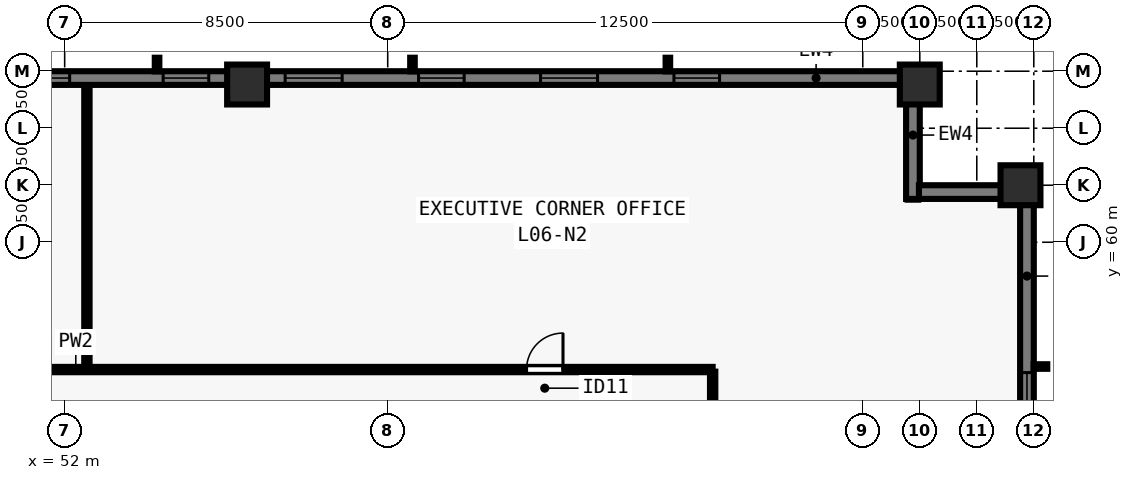
"""IFC4 building model, lengths in metres.
Left out: names, types, materials, properties, quantities, classifications, styles, units other than length and angle.
Written with IfcOpenShell. Run it as: python <this file> out.ifc"""

import sys

from ifc_helpers import new_model, si_unit, direction, frame, frame_2d, origin, origin_2d, place, context, subcontext, project, spatial, rectangle, extrude, element, fill, save


model = new_model("IFC4")
c1 = context("Model", 3, precision=1e-05, world=origin(), true_north=direction((0.0, 1.0)))
c2 = subcontext(c1, "Body", "Model", "MODEL_VIEW")
j1 = project(units=[si_unit("LENGTHUNIT", "METRE"), si_unit("PLANEANGLEUNIT", "RADIAN")], contexts=[c1])
p1 = place(None, origin())
s1 = spatial("IfcSite", under=j1, at=p1, CompositionType="ELEMENT")
p2 = place(p1, origin())
s2 = spatial("IfcBuilding", under=s1, at=p2, CompositionType="ELEMENT")
p3 = place(p2, frame((0.0, 0.0, 27.0)))
s3 = spatial("IfcBuildingStorey", under=s2, at=p3, CompositionType="ELEMENT", Elevation=27.0)
for number, where, z_axis, x_axis in (
    (1, (77.15, 61.5, 0.0), (0.0, 0.0, 1.0), (0.0, 1.0, 0.0)),
    (2, (74.5, 64.15, 0.0), (0.0, 0.0, 1.0), (1.0, 0.0, 0.0)),
    (3, (56.8, 64.15, 0.0), (0.0, 0.0, 1.0), (1.0, 0.0, 0.0)),
):
    element("IfcColumn", number, at=place(p3, frame(where, z_axis=z_axis, x_axis=x_axis)), inside=s3, PredefinedType="COLUMN", context=c2, shape_type="SweptSolid", body=[
        extrude(rectangle(XDim=1.05, YDim=1.05, at=origin_2d()), origin(), (0.0, 0.0, 1.0), 3.5),
    ])
p4 = place(p3, frame((29.5, 64.32, 0.0), z_axis=(0.0, 0.0, 1.0), x_axis=(1.0, 0.0, 0.0)))
e4 = element("IfcWall", 4, at=p4, inside=s3, PredefinedType="SOLIDWALL", context=c2, shape_type="SweptSolid", body=[
    extrude(rectangle(XDim=44.662, YDim=0.36, at=frame_2d((22.331, 0.0))), origin(), (0.0, 0.0, 1.0), 3.28),
])
p5 = place(p4, frame((4.93, 0.0, 0.8)))
e5 = element("IfcOpeningElement", 5, at=p5, cuts=e4, PredefinedType="OPENING", context=c2, shape_type="SweptSolid", body=[
    extrude(rectangle(XDim=1.2, YDim=1.544, at=frame_2d((0.6, 0.772))), frame((0.0, 0.19, 0.0), z_axis=(0.0, -1.0, 0.0), x_axis=(1.0, 0.0, 0.0)), (0.0, 0.0, 1.0), 0.38),
])
p6 = place(p4, frame((8.14, 0.0, 0.8)))
e6 = element("IfcOpeningElement", 6, at=p6, cuts=e4, PredefinedType="OPENING", context=c2, shape_type="SweptSolid", body=[
    extrude(rectangle(XDim=1.5, YDim=1.544, at=frame_2d((0.75, 0.772))), frame((0.0, 0.19, 0.0), z_axis=(0.0, -1.0, 0.0), x_axis=(1.0, 0.0, 0.0)), (0.0, 0.0, 1.0), 0.38),
])
p7 = place(p4, frame((11.65, 0.0, 0.8)))
e7 = element("IfcOpeningElement", 7, at=p7, cuts=e4, PredefinedType="OPENING", context=c2, shape_type="SweptSolid", body=[
    extrude(rectangle(XDim=1.2, YDim=1.544, at=frame_2d((0.6, 0.772))), frame((0.0, 0.19, 0.0), z_axis=(0.0, -1.0, 0.0), x_axis=(1.0, 0.0, 0.0)), (0.0, 0.0, 1.0), 0.38),
])
p8 = place(p4, frame((14.861, 0.0, 0.8)))
e8 = element("IfcOpeningElement", 8, at=p8, cuts=e4, PredefinedType="OPENING", context=c2, shape_type="SweptSolid", body=[
    extrude(rectangle(XDim=1.5, YDim=1.544, at=frame_2d((0.75, 0.772))), frame((0.0, 0.19, 0.0), z_axis=(0.0, -1.0, 0.0), x_axis=(1.0, 0.0, 0.0)), (0.0, 0.0, 1.0), 0.38),
])
p9 = place(p4, frame((18.821, 0.0, 0.8)))
e9 = element("IfcOpeningElement", 9, at=p9, cuts=e4, PredefinedType="OPENING", context=c2, shape_type="SweptSolid", body=[
    extrude(rectangle(XDim=1.2, YDim=1.544, at=frame_2d((0.6, 0.772))), frame((0.0, 0.19, 0.0), z_axis=(0.0, -1.0, 0.0), x_axis=(1.0, 0.0, 0.0)), (0.0, 0.0, 1.0), 0.38),
])
p10 = place(p4, frame((21.131, 0.0, 0.8)))
e10 = element("IfcOpeningElement", 10, at=p10, cuts=e4, PredefinedType="OPENING", context=c2, shape_type="SweptSolid", body=[
    extrude(rectangle(XDim=1.5, YDim=1.544, at=frame_2d((0.75, 0.772))), frame((0.0, 0.19, 0.0), z_axis=(0.0, -1.0, 0.0), x_axis=(1.0, 0.0, 0.0)), (0.0, 0.0, 1.0), 0.38),
])
p11 = place(p4, frame((25.091, 0.0, 0.8)))
e11 = element("IfcOpeningElement", 11, at=p11, cuts=e4, PredefinedType="OPENING", context=c2, shape_type="SweptSolid", body=[
    extrude(rectangle(XDim=1.2, YDim=1.544, at=frame_2d((0.6, 0.772))), frame((0.0, 0.19, 0.0), z_axis=(0.0, -1.0, 0.0), x_axis=(1.0, 0.0, 0.0)), (0.0, 0.0, 1.0), 0.38),
])
p12 = place(p4, frame((28.302, 0.0, 0.8)))
e12 = element("IfcOpeningElement", 12, at=p12, cuts=e4, PredefinedType="OPENING", context=c2, shape_type="SweptSolid", body=[
    extrude(rectangle(XDim=1.5, YDim=1.544, at=frame_2d((0.75, 0.772))), frame((0.0, 0.19, 0.0), z_axis=(0.0, -1.0, 0.0), x_axis=(1.0, 0.0, 0.0)), (0.0, 0.0, 1.0), 0.38),
])
p13 = place(p4, frame((31.812, 0.0, 0.8)))
e13 = element("IfcOpeningElement", 13, at=p13, cuts=e4, PredefinedType="OPENING", context=c2, shape_type="SweptSolid", body=[
    extrude(rectangle(XDim=1.2, YDim=1.544, at=frame_2d((0.6, 0.772))), frame((0.0, 0.19, 0.0), z_axis=(0.0, -1.0, 0.0), x_axis=(1.0, 0.0, 0.0)), (0.0, 0.0, 1.0), 0.38),
])
p14 = place(p4, frame((35.022, 0.0, 0.8)))
e14 = element("IfcOpeningElement", 14, at=p14, cuts=e4, PredefinedType="OPENING", context=c2, shape_type="SweptSolid", body=[
    extrude(rectangle(XDim=1.5, YDim=1.544, at=frame_2d((0.75, 0.772))), frame((0.0, 0.19, 0.0), z_axis=(0.0, -1.0, 0.0), x_axis=(1.0, 0.0, 0.0)), (0.0, 0.0, 1.0), 0.38),
])
p15 = place(p4, frame((38.532, 0.0, 0.8)))
e15 = element("IfcOpeningElement", 15, at=p15, cuts=e4, PredefinedType="OPENING", context=c2, shape_type="SweptSolid", body=[
    extrude(rectangle(XDim=1.2, YDim=1.544, at=frame_2d((0.6, 0.772))), frame((0.0, 0.19, 0.0), z_axis=(0.0, -1.0, 0.0), x_axis=(1.0, 0.0, 0.0)), (0.0, 0.0, 1.0), 0.38),
])
p16 = place(p3, frame((74.32, 64.5, 0.0), z_axis=(0.0, 0.0, 1.0), x_axis=(0.0, -1.0, 0.0)))
e16 = element("IfcWall", 16, at=p16, inside=s3, PredefinedType="SOLIDWALL", context=c2, shape_type="SweptSolid", body=[
    extrude(rectangle(XDim=3.36, YDim=0.36, at=frame_2d((1.68, 0.0))), origin(), (0.0, 0.0, 1.0), 3.28),
])
p17 = place(p3, frame((74.478, 61.32, 0.0), z_axis=(0.0, 0.0, 1.0), x_axis=(1.0, 0.0, 0.0)))
e17 = element("IfcWall", 17, at=p17, inside=s3, PredefinedType="SOLIDWALL", context=c2, shape_type="SweptSolid", body=[
    extrude(rectangle(XDim=2.684, YDim=0.36, at=frame_2d((1.342, 0.0))), origin(), (0.0, 0.0, 1.0), 3.28),
])
p18 = place(p3, frame((77.32, 61.5, 0.0), z_axis=(0.0, 0.0, 1.0), x_axis=(0.0, -1.0, 0.0)))
e18 = element("IfcWall", 18, at=p18, inside=s3, PredefinedType="SOLIDWALL", context=c2, shape_type="SweptSolid", body=[
    extrude(rectangle(XDim=44.662, YDim=0.36, at=frame_2d((22.331, 0.0))), origin(), (0.0, 0.0, 1.0), 3.28),
])
p19 = place(p18, frame((4.93, 0.0, 0.8)))
e19 = element("IfcOpeningElement", 19, at=p19, cuts=e18, PredefinedType="OPENING", context=c2, shape_type="SweptSolid", body=[
    extrude(rectangle(XDim=1.2, YDim=1.544, at=frame_2d((0.6, 0.772))), frame((0.0, 0.19, 0.0), z_axis=(0.0, -1.0, 0.0), x_axis=(1.0, 0.0, 0.0)), (0.0, 0.0, 1.0), 0.38),
])
p20 = place(p18, frame((8.14, 0.0, 0.8)))
e20 = element("IfcOpeningElement", 20, at=p20, cuts=e18, PredefinedType="OPENING", context=c2, shape_type="SweptSolid", body=[
    extrude(rectangle(XDim=1.5, YDim=1.544, at=frame_2d((0.75, 0.772))), frame((0.0, 0.19, 0.0), z_axis=(0.0, -1.0, 0.0), x_axis=(1.0, 0.0, 0.0)), (0.0, 0.0, 1.0), 0.38),
])
p21 = place(p18, frame((11.65, 0.0, 0.8)))
e21 = element("IfcOpeningElement", 21, at=p21, cuts=e18, PredefinedType="OPENING", context=c2, shape_type="SweptSolid", body=[
    extrude(rectangle(XDim=1.2, YDim=1.544, at=frame_2d((0.6, 0.772))), frame((0.0, 0.19, 0.0), z_axis=(0.0, -1.0, 0.0), x_axis=(1.0, 0.0, 0.0)), (0.0, 0.0, 1.0), 0.38),
])
p22 = place(p18, frame((14.861, 0.0, 0.8)))
e22 = element("IfcOpeningElement", 22, at=p22, cuts=e18, PredefinedType="OPENING", context=c2, shape_type="SweptSolid", body=[
    extrude(rectangle(XDim=1.5, YDim=1.544, at=frame_2d((0.75, 0.772))), frame((0.0, 0.19, 0.0), z_axis=(0.0, -1.0, 0.0), x_axis=(1.0, 0.0, 0.0)), (0.0, 0.0, 1.0), 0.38),
])
p23 = place(p18, frame((18.821, 0.0, 0.8)))
e23 = element("IfcOpeningElement", 23, at=p23, cuts=e18, PredefinedType="OPENING", context=c2, shape_type="SweptSolid", body=[
    extrude(rectangle(XDim=1.2, YDim=1.544, at=frame_2d((0.6, 0.772))), frame((0.0, 0.19, 0.0), z_axis=(0.0, -1.0, 0.0), x_axis=(1.0, 0.0, 0.0)), (0.0, 0.0, 1.0), 0.38),
])
p24 = place(p18, frame((22.431, 0.0, 0.8)))
e24 = element("IfcOpeningElement", 24, at=p24, cuts=e18, PredefinedType="OPENING", context=c2, shape_type="SweptSolid", body=[
    extrude(rectangle(XDim=1.5, YDim=1.544, at=frame_2d((0.75, 0.772))), frame((0.0, 0.19, 0.0), z_axis=(0.0, -1.0, 0.0), x_axis=(1.0, 0.0, 0.0)), (0.0, 0.0, 1.0), 0.38),
])
p25 = place(p18, frame((25.091, 0.0, 0.8)))
e25 = element("IfcOpeningElement", 25, at=p25, cuts=e18, PredefinedType="OPENING", context=c2, shape_type="SweptSolid", body=[
    extrude(rectangle(XDim=1.2, YDim=1.544, at=frame_2d((0.6, 0.772))), frame((0.0, 0.19, 0.0), z_axis=(0.0, -1.0, 0.0), x_axis=(1.0, 0.0, 0.0)), (0.0, 0.0, 1.0), 0.38),
])
p26 = place(p18, frame((28.302, 0.0, 0.8)))
e26 = element("IfcOpeningElement", 26, at=p26, cuts=e18, PredefinedType="OPENING", context=c2, shape_type="SweptSolid", body=[
    extrude(rectangle(XDim=1.5, YDim=1.544, at=frame_2d((0.75, 0.772))), frame((0.0, 0.19, 0.0), z_axis=(0.0, -1.0, 0.0), x_axis=(1.0, 0.0, 0.0)), (0.0, 0.0, 1.0), 0.38),
])
p27 = place(p18, frame((31.812, 0.0, 0.8)))
e27 = element("IfcOpeningElement", 27, at=p27, cuts=e18, PredefinedType="OPENING", context=c2, shape_type="SweptSolid", body=[
    extrude(rectangle(XDim=1.2, YDim=1.544, at=frame_2d((0.6, 0.772))), frame((0.0, 0.19, 0.0), z_axis=(0.0, -1.0, 0.0), x_axis=(1.0, 0.0, 0.0)), (0.0, 0.0, 1.0), 0.38),
])
p28 = place(p18, frame((35.022, 0.0, 0.8)))
e28 = element("IfcOpeningElement", 28, at=p28, cuts=e18, PredefinedType="OPENING", context=c2, shape_type="SweptSolid", body=[
    extrude(rectangle(XDim=1.5, YDim=1.544, at=frame_2d((0.75, 0.772))), frame((0.0, 0.19, 0.0), z_axis=(0.0, -1.0, 0.0), x_axis=(1.0, 0.0, 0.0)), (0.0, 0.0, 1.0), 0.38),
])
p29 = place(p18, frame((38.532, 0.0, 0.8)))
e29 = element("IfcOpeningElement", 29, at=p29, cuts=e18, PredefinedType="OPENING", context=c2, shape_type="SweptSolid", body=[
    extrude(rectangle(XDim=1.2, YDim=1.544, at=frame_2d((0.6, 0.772))), frame((0.0, 0.19, 0.0), z_axis=(0.0, -1.0, 0.0), x_axis=(1.0, 0.0, 0.0)), (0.0, 0.0, 1.0), 0.38),
])
p30 = place(p3, frame((34.95, 56.65, 0.0), z_axis=(0.0, 0.0, 1.0), x_axis=(1.0, 0.0, 0.0)))
e30 = element("IfcWall", 30, at=p30, inside=s3, PredefinedType="PARTITIONING", context=c2, shape_type="SweptSolid", body=[
    extrude(rectangle(XDim=34.1, YDim=0.14, at=frame_2d((17.05, 0.0))), origin(), (0.0, 0.0, 1.0), 3.28),
])
p31 = place(p30, frame((4.522, 0.0, 0.0)))
e31 = element("IfcOpeningElement", 31, at=p31, cuts=e30, PredefinedType="OPENING", context=c2, shape_type="SweptSolid", body=[
    extrude(rectangle(XDim=0.96, YDim=2.12, at=frame_2d((0.48, 1.06))), frame((0.0, 0.08, 0.0), z_axis=(0.0, -1.0, 0.0), x_axis=(1.0, 0.0, 0.0)), (0.0, 0.0, 1.0), 0.16),
])
p32 = place(p30, frame((29.202, 0.0, 0.0)))
e32 = element("IfcOpeningElement", 32, at=p32, cuts=e30, PredefinedType="OPENING", context=c2, shape_type="SweptSolid", body=[
    extrude(rectangle(XDim=0.96, YDim=2.12, at=frame_2d((0.48, 1.06))), frame((0.0, 0.08, 0.0), z_axis=(0.0, -1.0, 0.0), x_axis=(1.0, 0.0, 0.0)), (0.0, 0.0, 1.0), 0.16),
])
p33 = place(p3, frame((69.05, 21.405, 0.0), z_axis=(0.0, 0.0, 1.0), x_axis=(0.0, 1.0, 0.0)))
e33 = element("IfcWall", 33, at=p33, inside=s3, PredefinedType="PARTITIONING", context=c2, shape_type="SweptSolid", body=[
    extrude(rectangle(XDim=35.19, YDim=0.14, at=frame_2d((17.595, 0.0))), origin(), (0.0, 0.0, 1.0), 3.28),
])
p34 = place(p33, frame((8.545, 0.0, 0.0)))
e34 = element("IfcOpeningElement", 34, at=p34, cuts=e33, PredefinedType="OPENING", context=c2, shape_type="SweptSolid", body=[
    extrude(rectangle(XDim=0.96, YDim=2.12, at=frame_2d((0.48, 1.06))), frame((0.0, 0.08, 0.0), z_axis=(0.0, -1.0, 0.0), x_axis=(1.0, 0.0, 0.0)), (0.0, 0.0, 1.0), 0.16),
])
p35 = place(p33, frame((26.095, 0.0, 0.0)))
e35 = element("IfcOpeningElement", 35, at=p35, cuts=e33, PredefinedType="OPENING", context=c2, shape_type="SweptSolid", body=[
    extrude(rectangle(XDim=0.96, YDim=2.12, at=frame_2d((0.48, 1.06))), frame((0.0, 0.08, 0.0), z_axis=(0.0, -1.0, 0.0), x_axis=(1.0, 0.0, 0.0)), (0.0, 0.0, 1.0), 0.16),
])
p36 = place(p3, frame((52.585, 56.75, 0.0), z_axis=(0.0, 0.0, 1.0), x_axis=(0.0, 1.0, 0.0)))
e36 = element("IfcWall", 36, at=p36, inside=s3, PredefinedType="PARTITIONING", context=c2, shape_type="SweptSolid", body=[
    extrude(rectangle(XDim=7.33, YDim=0.14, at=frame_2d((3.665, 0.0))), origin(), (0.0, 0.0, 1.0), 2.849),
])
p37 = place(p10, origin())
e37 = element("IfcWindow", 37, at=p37, inside=s3, PartitioningType="SINGLE_PANEL", PredefinedType="WINDOW", context=c2, shape_type="SweptSolid", body=[
    extrude(rectangle(XDim=1.5, YDim=1.544, at=frame_2d((0.75, 0.772))), frame((0.0, -0.05, 0.0), z_axis=(0.0, -1.0, 0.0), x_axis=(1.0, 0.0, 0.0)), (0.0, 0.0, 1.0), 0.06),
])
fill(e10, e37)
p38 = place(p11, origin())
e38 = element("IfcWindow", 38, at=p38, inside=s3, PartitioningType="SINGLE_PANEL", PredefinedType="WINDOW", context=c2, shape_type="SweptSolid", body=[
    extrude(rectangle(XDim=1.2, YDim=1.544, at=frame_2d((0.6, 0.772))), frame((0.0, -0.05, 0.0), z_axis=(0.0, -1.0, 0.0), x_axis=(1.0, 0.0, 0.0)), (0.0, 0.0, 1.0), 0.06),
])
fill(e11, e38)
p39 = place(p12, origin())
e39 = element("IfcWindow", 39, at=p39, inside=s3, PartitioningType="SINGLE_PANEL", PredefinedType="WINDOW", context=c2, shape_type="SweptSolid", body=[
    extrude(rectangle(XDim=1.5, YDim=1.544, at=frame_2d((0.75, 0.772))), frame((0.0, -0.05, 0.0), z_axis=(0.0, -1.0, 0.0), x_axis=(1.0, 0.0, 0.0)), (0.0, 0.0, 1.0), 0.06),
])
fill(e12, e39)
p40 = place(p13, origin())
e40 = element("IfcWindow", 40, at=p40, inside=s3, PartitioningType="SINGLE_PANEL", PredefinedType="WINDOW", context=c2, shape_type="SweptSolid", body=[
    extrude(rectangle(XDim=1.2, YDim=1.544, at=frame_2d((0.6, 0.772))), frame((0.0, -0.05, 0.0), z_axis=(0.0, -1.0, 0.0), x_axis=(1.0, 0.0, 0.0)), (0.0, 0.0, 1.0), 0.06),
])
fill(e13, e40)
p41 = place(p14, origin())
e41 = element("IfcWindow", 41, at=p41, inside=s3, PartitioningType="SINGLE_PANEL", PredefinedType="WINDOW", context=c2, shape_type="SweptSolid", body=[
    extrude(rectangle(XDim=1.5, YDim=1.544, at=frame_2d((0.75, 0.772))), frame((0.0, -0.05, 0.0), z_axis=(0.0, -1.0, 0.0), x_axis=(1.0, 0.0, 0.0)), (0.0, 0.0, 1.0), 0.06),
])
fill(e14, e41)
p42 = place(p15, origin())
e42 = element("IfcWindow", 42, at=p42, inside=s3, PartitioningType="SINGLE_PANEL", PredefinedType="WINDOW", context=c2, shape_type="SweptSolid", body=[
    extrude(rectangle(XDim=1.2, YDim=1.544, at=frame_2d((0.6, 0.772))), frame((0.0, -0.05, 0.0), z_axis=(0.0, -1.0, 0.0), x_axis=(1.0, 0.0, 0.0)), (0.0, 0.0, 1.0), 0.06),
])
fill(e15, e42)
p43 = place(p19, origin())
e43 = element("IfcWindow", 43, at=p43, inside=s3, PartitioningType="SINGLE_PANEL", PredefinedType="WINDOW", context=c2, shape_type="SweptSolid", body=[
    extrude(rectangle(XDim=1.2, YDim=1.544, at=frame_2d((0.6, 0.772))), frame((0.0, -0.05, 0.0), z_axis=(0.0, -1.0, 0.0), x_axis=(1.0, 0.0, 0.0)), (0.0, 0.0, 1.0), 0.06),
])
fill(e19, e43)
p44 = place(p32, origin())
e44 = element("IfcDoor", 44, at=p44, inside=s3, OperationType="SINGLE_SWING_RIGHT", PredefinedType="DOOR", context=c2, shape_type="SweptSolid", body=[
    extrude(rectangle(XDim=0.96, YDim=2.12, at=frame_2d((0.48, 1.06))), frame((0.0, 0.025, 0.0), z_axis=(0.0, -1.0, 0.0), x_axis=(1.0, 0.0, 0.0)), (0.0, 0.0, 1.0), 0.05),
])
fill(e32, e44)
save(model, sys.argv[1])
